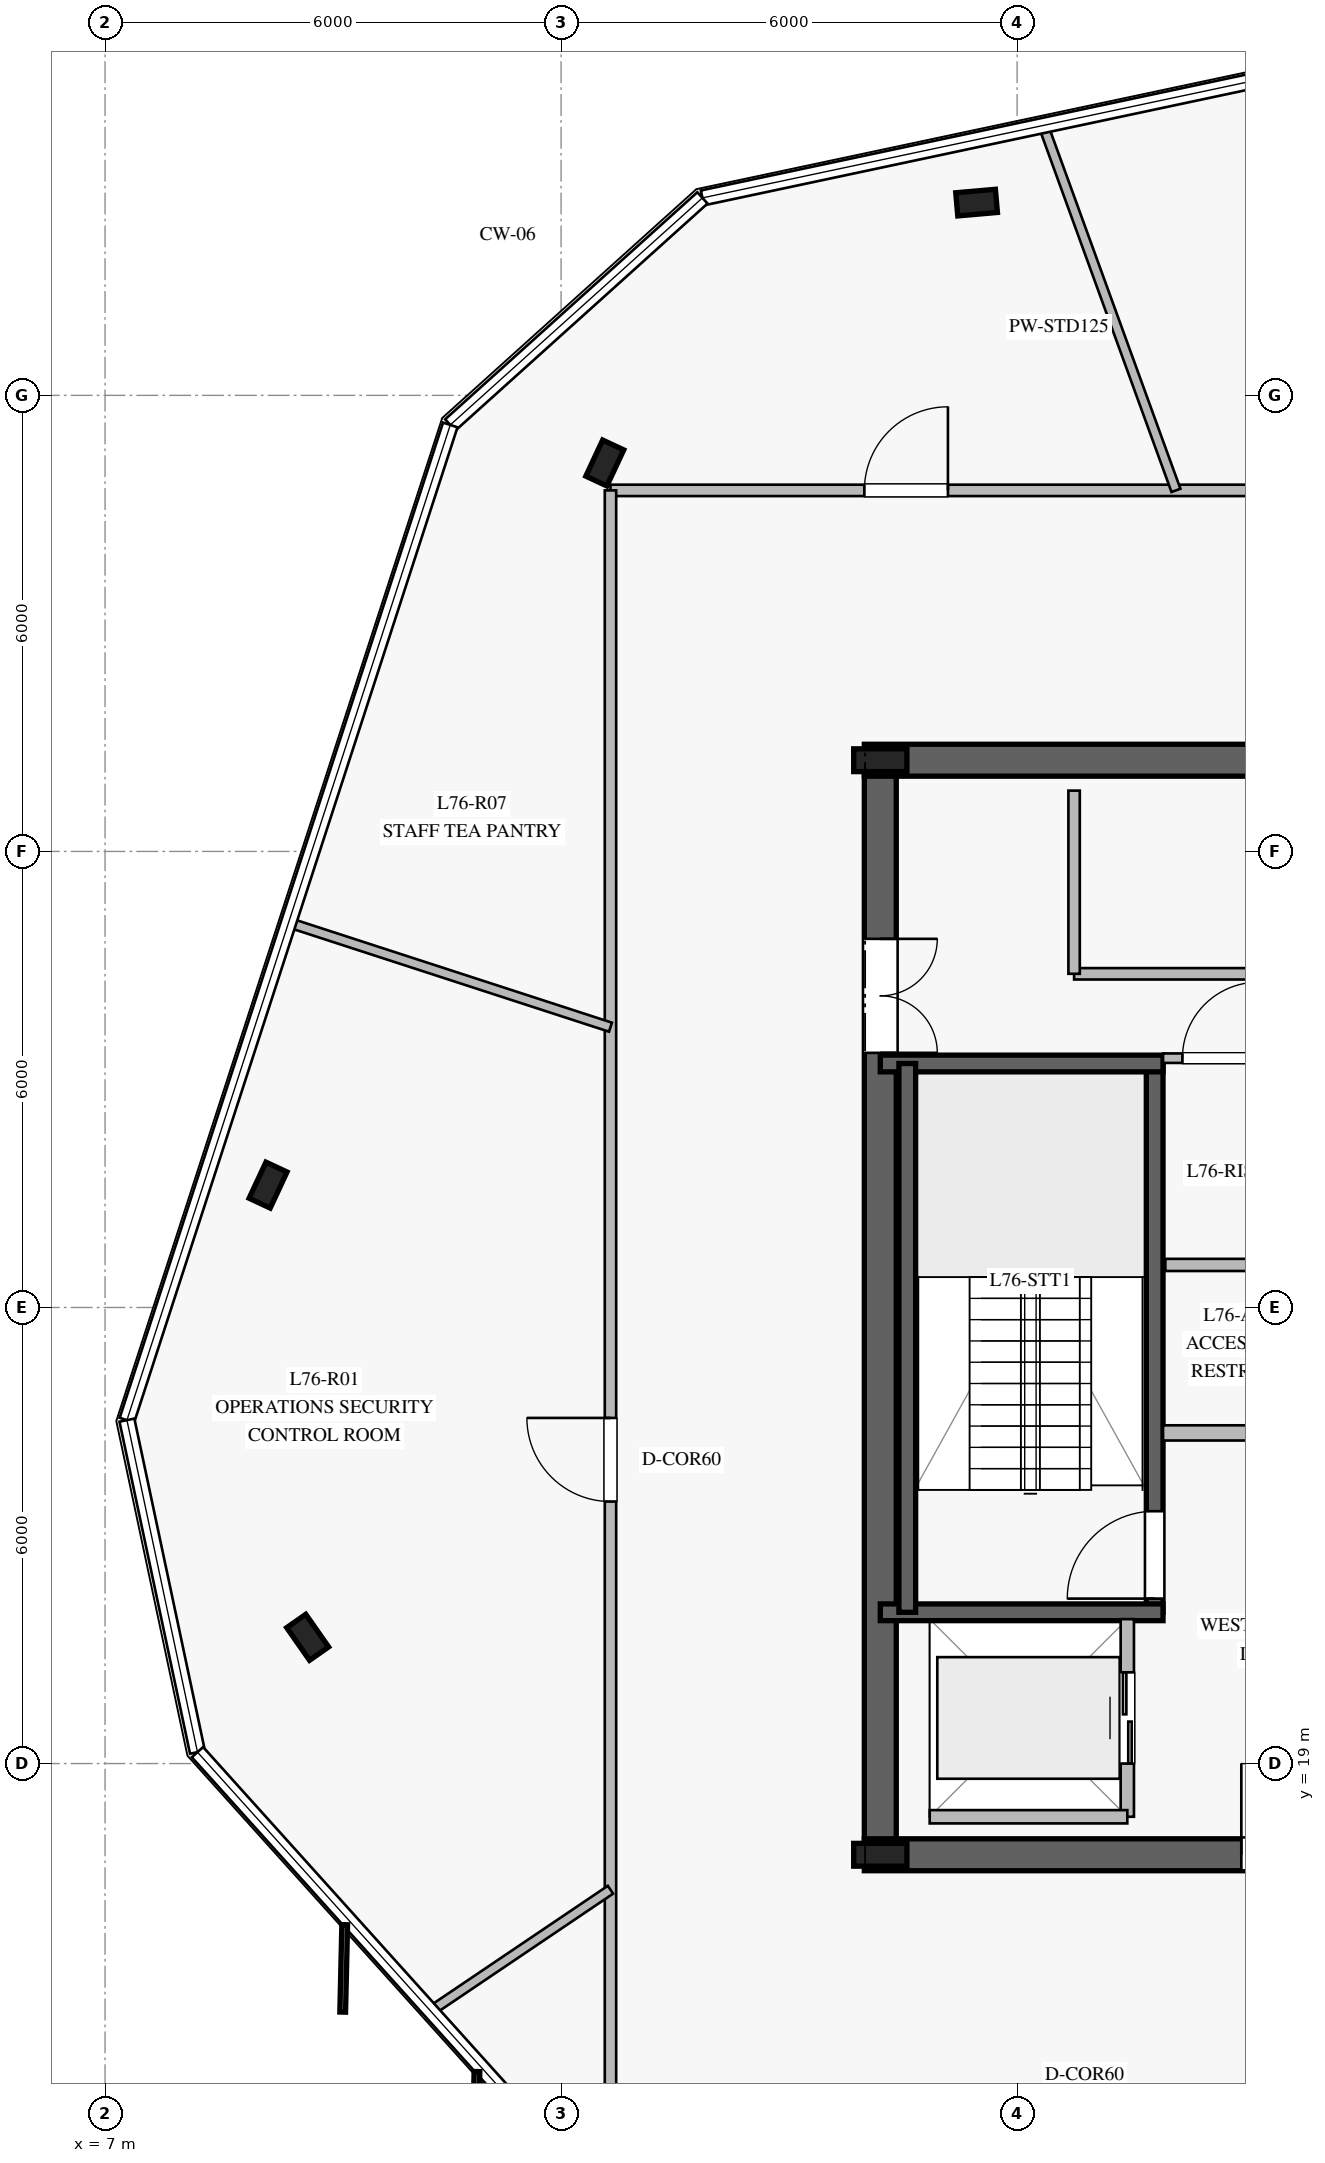
"""IFC4 building model, lengths in metres.
Left out: names, types, materials, properties, quantities, classifications, styles, units other than length and angle.
Written with IfcOpenShell. Run it as: python <this file> out.ifc"""

import sys

from ifc_helpers import new_model, si_unit, direction, frame, frame_2d, origin, origin_2d, place, context, subcontext, project, spatial, rectangle, i_section, extrude, element, fill, save


model = new_model("IFC4")
c1 = context("Model", 3, precision=1e-05, world=origin(), true_north=direction((0.0, 1.0)))
c2 = subcontext(c1, "Body", "Model", "MODEL_VIEW")
j1 = project(units=[si_unit("LENGTHUNIT", "METRE"), si_unit("PLANEANGLEUNIT", "RADIAN")], contexts=[c1])
p1 = place(None, origin())
s1 = spatial("IfcSite", under=j1, at=p1, CompositionType="ELEMENT")
p2 = place(p1, origin())
s2 = spatial("IfcBuilding", under=s1, at=p2, CompositionType="ELEMENT")
p3 = place(p2, frame((0.0, 0.0, 314.2)))
s3 = spatial("IfcBuildingStorey", under=s2, at=p3, CompositionType="ELEMENT", Elevation=314.2)
p4 = place(p3, frame((16.99, 17.8, 0.0), z_axis=(0.0, 0.0, 1.0), x_axis=(1.0, 0.0, 0.0)))
e1 = element("IfcWall", 1, at=p4, inside=s3, PredefinedType="SHEAR", context=c2, shape_type="SweptSolid", body=[
    extrude(rectangle(XDim=16.02, YDim=0.42, at=frame_2d((8.01, 0.0))), origin(), (0.0, 0.0, 1.0), 3.74),
])
p5 = place(p4, frame((4.96, 0.0, 0.0)))
e2 = element("IfcOpeningElement", 2, at=p5, cuts=e1, PredefinedType="OPENING", context=c2, shape_type="SweptSolid", body=[
    extrude(rectangle(XDim=1.2, YDim=2.25, at=frame_2d((0.6, 1.125))), frame((0.0, 0.22, 0.0), z_axis=(0.0, -1.0, 0.0), x_axis=(1.0, 0.0, 0.0)), (0.0, 0.0, 1.0), 0.44),
])
p6 = place(p4, frame((10.86, 0.0, 0.0)))
e3 = element("IfcOpeningElement", 3, at=p6, cuts=e1, PredefinedType="OPENING", context=c2, shape_type="SweptSolid", body=[
    extrude(rectangle(XDim=1.1, YDim=2.2, at=frame_2d((0.55, 1.1))), frame((0.0, 0.22, 0.0), z_axis=(0.0, -1.0, 0.0), x_axis=(1.0, 0.0, 0.0)), (0.0, 0.0, 1.0), 0.44),
])
p7 = place(p3, frame((33.01, 32.2, 0.0), z_axis=(0.0, 0.0, 1.0), x_axis=(-1.0, 0.0, 0.0)))
e4 = element("IfcWall", 4, at=p7, inside=s3, PredefinedType="SHEAR", context=c2, shape_type="SweptSolid", body=[
    extrude(rectangle(XDim=16.02, YDim=0.42, at=frame_2d((8.01, 0.0))), origin(), (0.0, 0.0, 1.0), 3.74),
])
p8 = place(p7, frame((4.96, 0.0, 0.0)))
e5 = element("IfcOpeningElement", 5, at=p8, cuts=e4, PredefinedType="OPENING", context=c2, shape_type="SweptSolid", body=[
    extrude(rectangle(XDim=1.2, YDim=2.25, at=frame_2d((0.6, 1.125))), frame((0.0, 0.22, 0.0), z_axis=(0.0, -1.0, 0.0), x_axis=(1.0, 0.0, 0.0)), (0.0, 0.0, 1.0), 0.44),
])
p9 = place(p7, frame((9.785, 0.0, 0.0)))
e6 = element("IfcOpeningElement", 6, at=p9, cuts=e4, PredefinedType="OPENING", context=c2, shape_type="SweptSolid", body=[
    extrude(rectangle(XDim=1.1, YDim=2.2, at=frame_2d((0.55, 1.1))), frame((0.0, 0.22, 0.0), z_axis=(0.0, -1.0, 0.0), x_axis=(1.0, 0.0, 0.0)), (0.0, 0.0, 1.0), 0.44),
])
p10 = place(p3, frame((17.2, 31.99, 0.0), z_axis=(0.0, 0.0, 1.0), x_axis=(0.0, -1.0, 0.0)))
e7 = element("IfcWall", 7, at=p10, inside=s3, PredefinedType="SHEAR", context=c2, shape_type="SweptSolid", body=[
    extrude(rectangle(XDim=13.98, YDim=0.42, at=frame_2d((6.99, 0.0))), origin(), (0.0, 0.0, 1.0), 3.74),
])
p11 = place(p10, frame((2.14, 0.0, 0.0)))
e8 = element("IfcOpeningElement", 8, at=p11, cuts=e7, PredefinedType="OPENING", context=c2, shape_type="SweptSolid", body=[
    extrude(rectangle(XDim=1.5, YDim=2.2, at=frame_2d((0.75, 1.1))), frame((0.0, 0.22, 0.0), z_axis=(0.0, -1.0, 0.0), x_axis=(1.0, 0.0, 0.0)), (0.0, 0.0, 1.0), 0.44),
])
for number, where, z_axis, x_axis in (
    (9, (17.2, 17.8, 0.0), (0.0, 0.0, 1.0), (1.0, 0.0, 0.0)),
    (10, (17.2, 32.2, 0.0), (0.0, 0.0, 1.0), (1.0, 0.0, 0.0)),
):
    element("IfcColumn", number, at=place(p3, frame(where, z_axis=z_axis, x_axis=x_axis)), inside=s3, PredefinedType="COLUMN", context=c2, shape_type="SweptSolid", body=[
        extrude(i_section(OverallWidth=0.3, OverallDepth=0.7, WebThickness=0.017, FlangeThickness=0.032, at=origin_2d()), origin(), (0.0, 0.0, 1.0), 4.0),
    ])
p12 = place(p3, frame((20.81, 20.99, 0.0), z_axis=(0.0, 0.0, 1.0), x_axis=(0.0, 1.0, 0.0)))
e11 = element("IfcWall", 11, at=p12, inside=s3, PredefinedType="SOLIDWALL", context=c2, shape_type="SweptSolid", body=[
    extrude(rectangle(XDim=7.22, YDim=0.22, at=frame_2d((3.61, 0.0))), origin(), (0.0, 0.0, 1.0), 3.74),
])
p13 = place(p12, frame((0.18, 0.0, 0.0)))
e12 = element("IfcOpeningElement", 12, at=p13, cuts=e11, PredefinedType="OPENING", context=c2, shape_type="SweptSolid", body=[
    extrude(rectangle(XDim=1.15, YDim=2.2, at=frame_2d((0.575, 1.1))), frame((0.0, 0.12, 0.0), z_axis=(0.0, -1.0, 0.0), x_axis=(1.0, 0.0, 0.0)), (0.0, 0.0, 1.0), 0.24),
])
for number, where, z_axis, x_axis in (
    (13, (17.2, 20.99, 0.0), (0.0, 0.0, 1.0), (1.0, 0.0, 0.0)),
    (14, (17.2, 28.21, 0.0), (0.0, 0.0, 1.0), (1.0, 0.0, 0.0)),
):
    element("IfcWall", number, at=place(p3, frame(where, z_axis=z_axis, x_axis=x_axis)), inside=s3, PredefinedType="SOLIDWALL", context=c2, shape_type="SweptSolid", body=[
        extrude(rectangle(XDim=3.72, YDim=0.22, at=frame_2d((1.86, 0.0))), origin(), (0.0, 0.0, 1.0), 3.74),
    ])
p14 = place(p3, frame((17.555, 28.21, 0.0), z_axis=(0.0, 0.0, 1.0), x_axis=(0.0, -1.0, 0.0)))
e15 = element("IfcWall", 15, at=p14, inside=s3, PredefinedType="SOLIDWALL", context=c2, shape_type="SweptSolid", body=[
    extrude(rectangle(XDim=7.22, YDim=0.22, at=frame_2d((3.61, 0.0))), origin(), (0.0, 0.0, 1.0), 3.74),
])
for number, where, z_axis, x_axis in (
    (16, (18.467, 39.536, 0.0), (0.0, 0.0, 1.0), (0.996, 0.087, 0.0)),
    (17, (13.575, 36.11, 0.0), (0.0, 0.0, 1.0), (0.423, 0.906, 0.0)),
    (18, (9.145, 26.61, 0.0), (0.0, 0.0, 1.0), (0.423, 0.906, 0.0)),
    (19, (9.666, 20.661, 0.0), (0.0, 0.0, 1.0), (-0.574, 0.819, 0.0)),
):
    element("IfcColumn", number, at=place(p3, frame(where, z_axis=z_axis, x_axis=x_axis)), inside=s3, PredefinedType="COLUMN", context=c2, shape_type="SweptSolid", body=[
        extrude(i_section(OverallWidth=0.306, OverallDepth=0.524, WebThickness=0.021, FlangeThickness=0.04, at=origin_2d()), origin(), (0.0, 0.0, 1.0), 4.0),
    ])
p15 = place(p3, frame((20.92, 23.35, 0.0), z_axis=(0.0, 0.0, 1.0), x_axis=(1.0, 0.0, 0.0)))
e20 = element("IfcWall", 20, at=p15, inside=s3, PredefinedType="PARTITIONING", context=c2, shape_type="SweptSolid", body=[
    extrude(rectangle(XDim=3.38, YDim=0.2, at=frame_2d((1.69, 0.0))), origin(), (0.0, 0.0, 1.0), 3.74),
])
p16 = place(p3, frame((20.92, 28.28, 0.0), z_axis=(0.0, 0.0, 1.0), x_axis=(1.0, 0.0, 0.0)))
e21 = element("IfcWall", 21, at=p16, inside=s3, PredefinedType="PARTITIONING", context=c2, shape_type="SweptSolid", body=[
    extrude(rectangle(XDim=3.405, YDim=0.125, at=frame_2d((1.703, 0.0))), origin(), (0.0, 0.0, 1.0), 3.74),
])
p17 = place(p16, frame((0.255, 0.0, 0.0)))
e22 = element("IfcOpeningElement", 22, at=p17, cuts=e21, PredefinedType="OPENING", context=c2, shape_type="SweptSolid", body=[
    extrude(rectangle(XDim=1.0, YDim=2.15, at=frame_2d((0.5, 1.075))), frame((0.0, 0.073, 0.0), z_axis=(0.0, -1.0, 0.0), x_axis=(1.0, 0.0, 0.0)), (0.0, 0.0, 1.0), 0.145),
])
p18 = place(p3, frame((20.95, 25.56, 0.0), z_axis=(0.0, 0.0, 1.0), x_axis=(1.0, 0.0, 0.0)))
e23 = element("IfcWall", 23, at=p18, inside=s3, PredefinedType="PLUMBINGWALL", context=c2, shape_type="SweptSolid", body=[
    extrude(rectangle(XDim=3.3, YDim=0.16, at=frame_2d((1.65, 0.0))), origin(), (0.0, 0.0, 1.0), 3.74),
])
p19 = place(p3, frame((19.75, 29.39, 0.0), z_axis=(0.0, 0.0, 1.0), x_axis=(1.0, 0.0, 0.0)))
e24 = element("IfcWall", 24, at=p19, inside=s3, PredefinedType="PARTITIONING", context=c2, shape_type="SweptSolid", body=[
    extrude(rectangle(XDim=5.9, YDim=0.15, at=frame_2d((2.95, 0.0))), origin(), (0.0, 0.0, 1.0), 3.74),
])
p20 = place(p3, frame((19.75, 29.39, 0.0), z_axis=(0.0, 0.0, 1.0), x_axis=(0.0, 1.0, 0.0)))
e25 = element("IfcWall", 25, at=p20, inside=s3, PredefinedType="PARTITIONING", context=c2, shape_type="SweptSolid", body=[
    extrude(rectangle(XDim=2.41, YDim=0.15, at=frame_2d((1.205, 0.0))), origin(), (0.0, 0.0, 1.0), 3.74),
])
p21 = place(p3, frame((20.45, 18.3, 0.0), z_axis=(0.0, 0.0, 1.0), x_axis=(0.0, 1.0, 0.0)))
e26 = element("IfcWall", 26, at=p21, inside=s3, PredefinedType="PARTITIONING", context=c2, shape_type="SweptSolid", body=[
    extrude(rectangle(XDim=2.6, YDim=0.175, at=frame_2d((1.3, 0.0))), origin(), (0.0, 0.0, 1.0), 3.74),
])
p22 = place(p21, frame((0.7, 0.0, 0.0)))
e27 = element("IfcOpeningElement", 27, at=p22, cuts=e26, PredefinedType="OPENING", context=c2, shape_type="SweptSolid", body=[
    extrude(rectangle(XDim=1.2, YDim=2.2, at=frame_2d((0.6, 1.1))), frame((0.0, 0.098, 0.0), z_axis=(0.0, -1.0, 0.0), x_axis=(1.0, 0.0, 0.0)), (0.0, 0.0, 1.0), 0.195),
])
p23 = place(p3, frame((17.85, 18.3, 0.0), z_axis=(0.0, 0.0, 1.0), x_axis=(1.0, 0.0, 0.0)))
e28 = element("IfcWall", 28, at=p23, inside=s3, PredefinedType="PARTITIONING", context=c2, shape_type="SweptSolid", body=[
    extrude(rectangle(XDim=2.6, YDim=0.175, at=frame_2d((1.3, 0.0))), origin(), (0.0, 0.0, 1.0), 3.74),
])
p24 = place(p3, frame((13.65, 35.75, 0.0), z_axis=(0.0, 0.0, 1.0), x_axis=(1.0, 0.0, 0.0)))
e29 = element("IfcWall", 29, at=p24, inside=s3, PredefinedType="PARTITIONING", context=c2, shape_type="SweptSolid", body=[
    extrude(rectangle(XDim=22.7, YDim=0.15, at=frame_2d((11.35, 0.0))), origin(), (0.0, 0.0, 1.0), 3.24),
])
p25 = place(p24, frame((17.322, 0.0, 0.0)))
e30 = element("IfcOpeningElement", 30, at=p25, cuts=e29, PredefinedType="OPENING", context=c2, shape_type="SweptSolid", body=[
    extrude(rectangle(XDim=1.1, YDim=2.2, at=frame_2d((0.55, 1.1))), frame((0.0, 0.085, 0.0), z_axis=(0.0, -1.0, 0.0), x_axis=(1.0, 0.0, 0.0)), (0.0, 0.0, 1.0), 0.17),
])
p26 = place(p24, frame((9.864, 0.0, 0.0)))
e31 = element("IfcOpeningElement", 31, at=p26, cuts=e29, PredefinedType="OPENING", context=c2, shape_type="SweptSolid", body=[
    extrude(rectangle(XDim=1.1, YDim=2.2, at=frame_2d((0.55, 1.1))), frame((0.0, 0.085, 0.0), z_axis=(0.0, -1.0, 0.0), x_axis=(1.0, 0.0, 0.0)), (0.0, 0.0, 1.0), 0.17),
])
p27 = place(p24, frame((3.34, 0.0, 0.0)))
e32 = element("IfcOpeningElement", 32, at=p27, cuts=e29, PredefinedType="OPENING", context=c2, shape_type="SweptSolid", body=[
    extrude(rectangle(XDim=1.1, YDim=2.2, at=frame_2d((0.55, 1.1))), frame((0.0, 0.085, 0.0), z_axis=(0.0, -1.0, 0.0), x_axis=(1.0, 0.0, 0.0)), (0.0, 0.0, 1.0), 0.17),
])
p28 = place(p3, frame((13.65, 14.25, 0.0), z_axis=(0.0, 0.0, 1.0), x_axis=(0.0, 1.0, 0.0)))
e33 = element("IfcWall", 33, at=p28, inside=s3, PredefinedType="PARTITIONING", context=c2, shape_type="SweptSolid", body=[
    extrude(rectangle(XDim=21.5, YDim=0.15, at=frame_2d((10.75, 0.0))), origin(), (0.0, 0.0, 1.0), 3.24),
])
p29 = place(p28, frame((8.197, 0.0, 0.0)))
e34 = element("IfcOpeningElement", 34, at=p29, cuts=e33, PredefinedType="OPENING", context=c2, shape_type="SweptSolid", body=[
    extrude(rectangle(XDim=1.1, YDim=2.2, at=frame_2d((0.55, 1.1))), frame((0.0, 0.085, 0.0), z_axis=(0.0, -1.0, 0.0), x_axis=(1.0, 0.0, 0.0)), (0.0, 0.0, 1.0), 0.17),
])
p30 = place(p3, frame((21.09, 35.75, 0.0), z_axis=(0.0, 0.0, 1.0), x_axis=(-0.341685321623, 0.939814418376, 0.0)))
e35 = element("IfcWall", 35, at=p30, inside=s3, PredefinedType="PARTITIONING", context=c2, shape_type="SweptSolid", body=[
    extrude(rectangle(XDim=5.092, YDim=0.125, at=frame_2d((2.546, 0.0))), origin(), (0.0, 0.0, 1.0), 3.24),
])
p31 = place(p3, frame((13.65, 28.688, 0.0), z_axis=(0.0, 0.0, 1.0), x_axis=(-0.951060347847, 0.309005201823, 0.0)))
e36 = element("IfcWall", 36, at=p31, inside=s3, PredefinedType="PARTITIONING", context=c2, shape_type="SweptSolid", body=[
    extrude(rectangle(XDim=4.437, YDim=0.125, at=frame_2d((2.219, 0.0))), origin(), (0.0, 0.0, 1.0), 3.24),
])
p32 = place(p3, frame((13.65, 17.34, 0.0), z_axis=(0.0, 0.0, 1.0), x_axis=(-0.828847677001, -0.559474332146, 0.0)))
e37 = element("IfcWall", 37, at=p32, inside=s3, PredefinedType="PARTITIONING", context=c2, shape_type="SweptSolid", body=[
    extrude(rectangle(XDim=2.839, YDim=0.125, at=frame_2d((1.419, 0.0))), origin(), (0.0, 0.0, 1.0), 3.24),
])
p33 = place(p13, origin())
e38 = element("IfcDoor", 38, at=p33, inside=s3, OperationType="SINGLE_SWING_LEFT", PredefinedType="DOOR", context=c2, shape_type="SweptSolid", body=[
    extrude(rectangle(XDim=1.15, YDim=2.2, at=frame_2d((0.575, 1.1))), frame((0.0, 0.025, 0.0), z_axis=(0.0, -1.0, 0.0), x_axis=(1.0, 0.0, 0.0)), (0.0, 0.0, 1.0), 0.05),
])
fill(e12, e38)
p34 = place(p5, origin())
e39 = element("IfcDoor", 39, at=p34, inside=s3, OperationType="SINGLE_SWING_LEFT", PredefinedType="DOOR", context=c2, shape_type="SweptSolid", body=[
    extrude(rectangle(XDim=1.2, YDim=2.25, at=frame_2d((0.6, 1.125))), frame((0.0, 0.025, 0.0), z_axis=(0.0, -1.0, 0.0), x_axis=(1.0, 0.0, 0.0)), (0.0, 0.0, 1.0), 0.05),
])
fill(e2, e39)
p35 = place(p11, origin())
e40 = element("IfcDoor", 40, at=p35, inside=s3, OperationType="DOUBLE_DOOR_SINGLE_SWING", PredefinedType="DOOR", context=c2, shape_type="SweptSolid", body=[
    extrude(rectangle(XDim=1.5, YDim=2.2, at=frame_2d((0.75, 1.1))), frame((0.0, 0.025, 0.0), z_axis=(0.0, -1.0, 0.0), x_axis=(1.0, 0.0, 0.0)), (0.0, 0.0, 1.0), 0.05),
])
fill(e8, e40)
p36 = place(p17, origin())
e41 = element("IfcDoor", 41, at=p36, inside=s3, OperationType="SINGLE_SWING_RIGHT", PredefinedType="DOOR", context=c2, shape_type="SweptSolid", body=[
    extrude(rectangle(XDim=1.0, YDim=2.15, at=frame_2d((0.5, 1.075))), frame((0.0, 0.025, 0.0), z_axis=(0.0, -1.0, 0.0), x_axis=(1.0, 0.0, 0.0)), (0.0, 0.0, 1.0), 0.05),
])
fill(e22, e41)
p37 = place(p22, origin())
e42 = element("IfcDoor", 42, at=p37, inside=s3, OperationType="DOUBLE_DOOR_SLIDING", PredefinedType="DOOR", context=c2, shape_type="SweptSolid", body=[
    extrude(rectangle(XDim=1.2, YDim=2.2, at=frame_2d((0.6, 1.1))), frame((0.0, 0.025, 0.0), z_axis=(0.0, -1.0, 0.0), x_axis=(1.0, 0.0, 0.0)), (0.0, 0.0, 1.0), 0.05),
])
fill(e27, e42)
p38 = place(p29, origin())
e43 = element("IfcDoor", 43, at=p38, inside=s3, OperationType="SINGLE_SWING_RIGHT", PredefinedType="DOOR", context=c2, shape_type="SweptSolid", body=[
    extrude(rectangle(XDim=1.1, YDim=2.2, at=frame_2d((0.55, 1.1))), frame((0.0, 0.025, 0.0), z_axis=(0.0, -1.0, 0.0), x_axis=(1.0, 0.0, 0.0)), (0.0, 0.0, 1.0), 0.05),
])
fill(e34, e43)
p39 = place(p27, origin())
e44 = element("IfcDoor", 44, at=p39, inside=s3, OperationType="SINGLE_SWING_RIGHT", PredefinedType="DOOR", context=c2, shape_type="SweptSolid", body=[
    extrude(rectangle(XDim=1.1, YDim=2.2, at=frame_2d((0.55, 1.1))), frame((0.0, 0.025, 0.0), z_axis=(0.0, -1.0, 0.0), x_axis=(1.0, 0.0, 0.0)), (0.0, 0.0, 1.0), 0.05),
])
fill(e32, e44)
save(model, sys.argv[1])
